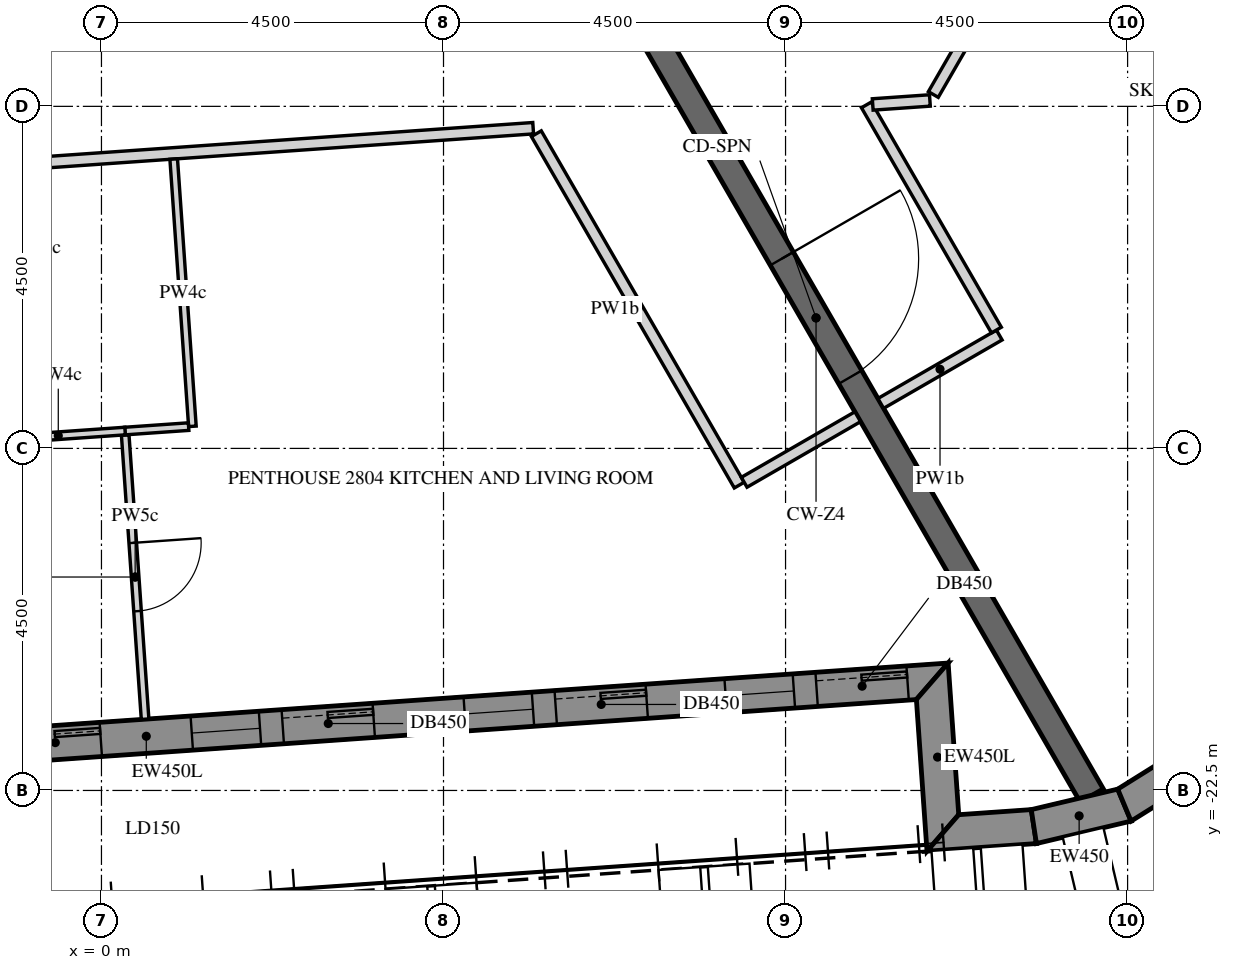
"""IFC4 building model, lengths in metres.
Left out: names, types, materials, properties, quantities, classifications, styles, units other than length and angle.
Written with IfcOpenShell. Run it as: python <this file> out.ifc"""

import sys

from ifc_helpers import new_model, si_unit, direction, frame, frame_2d, origin, place, context, subcontext, project, spatial, polyline, rectangle, outline, extrude, element, fill, save


model = new_model("IFC4")
c1 = context("Model", 3, precision=1e-05, world=origin(), true_north=direction((0.0, 1.0)))
c2 = subcontext(c1, "Body", "Model", "MODEL_VIEW")
j1 = project(units=[si_unit("LENGTHUNIT", "METRE"), si_unit("PLANEANGLEUNIT", "RADIAN")], contexts=[c1])
p1 = place(None, origin())
s1 = spatial("IfcSite", under=j1, at=p1, CompositionType="ELEMENT")
p2 = place(p1, origin())
s2 = spatial("IfcBuilding", under=s1, at=p2, CompositionType="ELEMENT")
p3 = place(p2, frame((0.0, 0.0, 361.2)))
s3 = spatial("IfcBuildingStorey", under=s2, at=p3, CompositionType="ELEMENT", Elevation=361.2)
p4 = place(p3, frame((-9.751, -22.51, -0.15), z_axis=(0.0, 0.0, 1.0), x_axis=(0.997564460173, 0.06975061147, 0.0)))
e1 = element("IfcWall", 1, at=p4, inside=s3, PredefinedType="SOLIDWALL", context=c2, shape_type="SweptSolid", body=[
    extrude(outline(polyline([(0.225, -0.225), (20.507, -0.225), (20.957, 0.225), (-0.225, 0.225), (0.225, -0.225)])), origin(), (0.0, 0.0, 1.0), 3.9),
])
p5 = place(p4, frame((0.325, 0.0, 1.05)))
e2 = element("IfcOpeningElement", 2, at=p5, cuts=e1, PredefinedType="OPENING", context=c2, shape_type="SweptSolid", body=[
    extrude(rectangle(XDim=0.9, YDim=1.5, at=frame_2d((0.45, 0.75))), frame((0.0, 0.235, 0.0), z_axis=(0.0, -1.0, 0.0), x_axis=(1.0, 0.0, 0.0)), (0.0, 0.0, 1.0), 0.47),
])
p6 = place(p4, frame((1.525, 0.0, 0.15)))
e3 = element("IfcOpeningElement", 3, at=p6, cuts=e1, PredefinedType="OPENING", context=c2, shape_type="SweptSolid", body=[
    extrude(rectangle(XDim=1.2, YDim=2.4, at=frame_2d((0.6, 1.2))), frame((0.0, 0.235, 0.0), z_axis=(0.0, -1.0, 0.0), x_axis=(1.0, 0.0, 0.0)), (0.0, 0.0, 1.0), 0.47),
])
p7 = place(p4, frame((3.766, 0.0, 1.05)))
e4 = element("IfcOpeningElement", 4, at=p7, cuts=e1, PredefinedType="OPENING", context=c2, shape_type="SweptSolid", body=[
    extrude(rectangle(XDim=0.9, YDim=1.5, at=frame_2d((0.45, 0.75))), frame((0.0, 0.235, 0.0), z_axis=(0.0, -1.0, 0.0), x_axis=(1.0, 0.0, 0.0)), (0.0, 0.0, 1.0), 0.47),
])
p8 = place(p4, frame((4.966, 0.0, 0.15)))
e5 = element("IfcOpeningElement", 5, at=p8, cuts=e1, PredefinedType="OPENING", context=c2, shape_type="SweptSolid", body=[
    extrude(rectangle(XDim=1.2, YDim=2.4, at=frame_2d((0.6, 1.2))), frame((0.0, 0.235, 0.0), z_axis=(0.0, -1.0, 0.0), x_axis=(1.0, 0.0, 0.0)), (0.0, 0.0, 1.0), 0.47),
])
p9 = place(p4, frame((7.366, 0.0, 1.05)))
e6 = element("IfcOpeningElement", 6, at=p9, cuts=e1, PredefinedType="OPENING", context=c2, shape_type="SweptSolid", body=[
    extrude(rectangle(XDim=0.9, YDim=1.5, at=frame_2d((0.45, 0.75))), frame((0.0, 0.235, 0.0), z_axis=(0.0, -1.0, 0.0), x_axis=(1.0, 0.0, 0.0)), (0.0, 0.0, 1.0), 0.47),
])
p10 = place(p4, frame((8.566, 0.0, 0.15)))
e7 = element("IfcOpeningElement", 7, at=p10, cuts=e1, PredefinedType="OPENING", context=c2, shape_type="SweptSolid", body=[
    extrude(rectangle(XDim=1.2, YDim=2.4, at=frame_2d((0.6, 1.2))), frame((0.0, 0.235, 0.0), z_axis=(0.0, -1.0, 0.0), x_axis=(1.0, 0.0, 0.0)), (0.0, 0.0, 1.0), 0.47),
])
p11 = place(p4, frame((10.966, 0.0, 1.05)))
e8 = element("IfcOpeningElement", 8, at=p11, cuts=e1, PredefinedType="OPENING", context=c2, shape_type="SweptSolid", body=[
    extrude(rectangle(XDim=0.9, YDim=1.5, at=frame_2d((0.45, 0.75))), frame((0.0, 0.235, 0.0), z_axis=(0.0, -1.0, 0.0), x_axis=(1.0, 0.0, 0.0)), (0.0, 0.0, 1.0), 0.47),
])
p12 = place(p4, frame((12.166, 0.0, 0.15)))
e9 = element("IfcOpeningElement", 9, at=p12, cuts=e1, PredefinedType="OPENING", context=c2, shape_type="SweptSolid", body=[
    extrude(rectangle(XDim=1.2, YDim=2.4, at=frame_2d((0.6, 1.2))), frame((0.0, 0.235, 0.0), z_axis=(0.0, -1.0, 0.0), x_axis=(1.0, 0.0, 0.0)), (0.0, 0.0, 1.0), 0.47),
])
p13 = place(p4, frame((14.566, 0.0, 1.05)))
e10 = element("IfcOpeningElement", 10, at=p13, cuts=e1, PredefinedType="OPENING", context=c2, shape_type="SweptSolid", body=[
    extrude(rectangle(XDim=0.9, YDim=1.5, at=frame_2d((0.45, 0.75))), frame((0.0, 0.235, 0.0), z_axis=(0.0, -1.0, 0.0), x_axis=(1.0, 0.0, 0.0)), (0.0, 0.0, 1.0), 0.47),
])
p14 = place(p4, frame((15.766, 0.0, 0.15)))
e11 = element("IfcOpeningElement", 11, at=p14, cuts=e1, PredefinedType="OPENING", context=c2, shape_type="SweptSolid", body=[
    extrude(rectangle(XDim=1.2, YDim=2.4, at=frame_2d((0.6, 1.2))), frame((0.0, 0.235, 0.0), z_axis=(0.0, -1.0, 0.0), x_axis=(1.0, 0.0, 0.0)), (0.0, 0.0, 1.0), 0.47),
])
p15 = place(p4, frame((18.007, 0.0, 1.05)))
e12 = element("IfcOpeningElement", 12, at=p15, cuts=e1, PredefinedType="OPENING", context=c2, shape_type="SweptSolid", body=[
    extrude(rectangle(XDim=0.9, YDim=1.5, at=frame_2d((0.45, 0.75))), frame((0.0, 0.235, 0.0), z_axis=(0.0, -1.0, 0.0), x_axis=(1.0, 0.0, 0.0)), (0.0, 0.0, 1.0), 0.47),
])
p16 = place(p4, frame((19.207, 0.0, 0.15)))
e13 = element("IfcOpeningElement", 13, at=p16, cuts=e1, PredefinedType="OPENING", context=c2, shape_type="SweptSolid", body=[
    extrude(rectangle(XDim=1.2, YDim=2.4, at=frame_2d((0.6, 1.2))), frame((0.0, 0.235, 0.0), z_axis=(0.0, -1.0, 0.0), x_axis=(1.0, 0.0, 0.0)), (0.0, 0.0, 1.0), 0.47),
])
p17 = place(p3, frame((10.93, -21.064, -0.15), z_axis=(0.0, 0.0, 1.0), x_axis=(0.069702791886, -0.99756780261, 0.0)))
e14 = element("IfcWall", 14, at=p17, inside=s3, PredefinedType="SOLIDWALL", context=c2, shape_type="SweptSolid", body=[
    extrude(outline(polyline([(0.225, -0.225), (2.225, -0.225), (1.775, 0.225), (-0.225, 0.225), (0.225, -0.225)])), origin(), (0.0, 0.0, 1.0), 3.9),
])
p18 = place(p3, frame((11.07, -23.059, -0.15), z_axis=(0.0, 0.0, 1.0), x_axis=(0.997562933087, 0.069772448216, 0.0)))
e15 = element("IfcWall", 15, at=p18, inside=s3, PredefinedType="SOLIDWALL", context=c2, shape_type="SweptSolid", body=[
    extrude(outline(polyline([(-0.225, -0.225), (1.219, -0.225), (1.182, 0.225), (0.225, 0.225), (-0.225, -0.225)])), origin(), (0.0, 0.0, 1.0), 3.9),
])
p19 = place(p3, frame((12.267, -22.975, -0.15), z_axis=(0.0, 0.0, 1.0), x_axis=(0.973026131006, 0.230694924913, 0.0)))
e16 = element("IfcWall", 16, at=p19, inside=s3, PredefinedType="SOLIDWALL", context=c2, shape_type="SweptSolid", body=[
    extrude(outline(polyline([(-0.018, -0.225), (1.261, -0.225), (1.188, 0.225), (0.018, 0.225), (-0.018, -0.225)])), origin(), (0.0, 0.0, 1.0), 3.9),
])
p20 = place(p3, frame((13.458, -22.693, -0.15), z_axis=(0.0, 0.0, 1.0), x_axis=(0.848009505552, 0.529981017107, 0.0)))
e17 = element("IfcWall", 17, at=p20, inside=s3, PredefinedType="SOLIDWALL", context=c2, shape_type="SweptSolid", body=[
    extrude(outline(polyline([(-0.037, -0.225), (1.261, -0.225), (1.188, 0.225), (0.037, 0.225), (-0.037, -0.225)])), origin(), (0.0, 0.0, 1.0), 3.9),
])
p21 = place(p3, frame((5.773, -10.0, -0.15), z_axis=(0.0, 0.0, 1.0), x_axis=(0.500007911273, -0.866020836161, 0.0)))
e18 = element("IfcWall", 18, at=p21, inside=s3, PredefinedType="SHEAR", context=c2, shape_type="SweptSolid", body=[
    extrude(rectangle(XDim=14.51, YDim=0.35, at=frame_2d((7.255, 0.0))), origin(), (0.0, 0.0, 1.0), 3.9),
])
p22 = place(p21, frame((6.355, 0.0, 0.15)))
e19 = element("IfcOpeningElement", 19, at=p22, cuts=e18, PredefinedType="OPENING", context=c2, shape_type="SweptSolid", body=[
    extrude(rectangle(XDim=1.8, YDim=2.4, at=frame_2d((0.9, 1.2))), frame((0.0, 0.185, 0.0), z_axis=(0.0, -1.0, 0.0), x_axis=(1.0, 0.0, 0.0)), (0.0, 0.0, 1.0), 0.37),
])
p23 = place(p3, frame((-9.97, -14.882, 0.0), z_axis=(0.0, 0.0, 1.0), x_axis=(0.997564384496, 0.06975169378, 0.0)))
e20 = element("IfcWall", 20, at=p23, inside=s3, PredefinedType="PARTITIONING", context=c2, shape_type="SweptSolid", body=[
    extrude(rectangle(XDim=15.688, YDim=0.15, at=frame_2d((7.844, 0.0))), origin(), (0.0, 0.0, 1.0), 2.82),
])
p24 = place(p23, frame((6.042, 0.0, 0.0)))
e21 = element("IfcOpeningElement", 21, at=p24, cuts=e20, PredefinedType="OPENING", context=c2, shape_type="SweptSolid", body=[
    extrude(rectangle(XDim=1.0, YDim=2.1, at=frame_2d((0.5, 1.05))), frame((0.0, 0.085, 0.0), z_axis=(0.0, -1.0, 0.0), x_axis=(1.0, 0.0, 0.0)), (0.0, 0.0, 1.0), 0.17),
])
p25 = place(p3, frame((5.721, -13.86, 0.0), z_axis=(0.0, 0.0, 1.0), x_axis=(0.499970524249, -0.866042420948, 0.0)))
e22 = element("IfcWall", 22, at=p25, inside=s3, PredefinedType="PARTITIONING", context=c2, shape_type="SweptSolid", body=[
    extrude(rectangle(XDim=5.339, YDim=0.15, at=frame_2d((2.669, 0.0))), origin(), (0.0, 0.0, 1.0), 2.82),
])
p26 = place(p3, frame((8.456, -18.446, 0.0), z_axis=(0.0, 0.0, 1.0), x_axis=(0.866013532718, 0.500020560727, 0.0)))
e23 = element("IfcWall", 23, at=p26, inside=s3, PredefinedType="PARTITIONING", context=c2, shape_type="SweptSolid", body=[
    extrude(rectangle(XDim=1.725, YDim=0.15, at=frame_2d((0.863, 0.0))), origin(), (0.0, 0.0, 1.0), 2.82),
])
p27 = place(p3, frame((6.245, -11.944, 0.0), z_axis=(0.0, 0.0, 1.0), x_axis=(-0.997564707029, -0.069747080866, 0.0)))
e24 = element("IfcWall", 24, at=p27, inside=s3, PredefinedType="PARTITIONING", context=c2, shape_type="SweptSolid", body=[
    extrude(rectangle(XDim=15.339, YDim=0.15, at=frame_2d((7.669, 0.0))), origin(), (0.0, 0.0, 1.0), 2.82),
])
p28 = place(p27, frame((7.219, 0.0, 0.0)))
e25 = element("IfcOpeningElement", 25, at=p28, cuts=e24, PredefinedType="OPENING", context=c2, shape_type="SweptSolid", body=[
    extrude(rectangle(XDim=0.9, YDim=2.1, at=frame_2d((0.45, 1.05))), frame((0.0, 0.085, 0.0), z_axis=(0.0, -1.0, 0.0), x_axis=(1.0, 0.0, 0.0)), (0.0, 0.0, 1.0), 0.17),
])
p29 = place(p3, frame((10.253, -17.408, 0.0), z_axis=(0.0, 0.0, 1.0), x_axis=(0.866047807691, 0.499961193289, 0.0)))
e26 = element("IfcWall", 26, at=p29, inside=s3, PredefinedType="PARTITIONING", context=c2, shape_type="SweptSolid", body=[
    extrude(rectangle(XDim=1.8, YDim=0.15, at=frame_2d((0.9, 0.0))), origin(), (0.0, 0.0, 1.0), 2.82),
])
p30 = place(p3, frame((11.774, -16.443, 0.0), z_axis=(0.0, 0.0, 1.0), x_axis=(-0.499938683108, 0.866060802215, 0.0)))
e27 = element("IfcWall", 27, at=p30, inside=s3, PredefinedType="PARTITIONING", context=c2, shape_type="SweptSolid", body=[
    extrude(rectangle(XDim=3.421, YDim=0.15, at=frame_2d((1.71, 0.0))), origin(), (0.0, 0.0, 1.0), 2.82),
])
p31 = place(p3, frame((10.147, -13.475, 0.0), z_axis=(0.0, 0.0, 1.0), x_axis=(0.997549934395, 0.069958047347, 0.0)))
e28 = element("IfcWall", 28, at=p31, inside=s3, PredefinedType="PARTITIONING", context=c2, shape_type="SweptSolid", body=[
    extrude(rectangle(XDim=0.754, YDim=0.15, at=frame_2d((0.377, 0.0))), origin(), (0.0, 0.0, 1.0), 2.82),
])
p32 = place(p3, frame((10.944, -13.344, 0.0), z_axis=(0.0, 0.0, 1.0), x_axis=(0.500003210163, 0.866023550388, 0.0)))
e29 = element("IfcWall", 29, at=p32, inside=s3, PredefinedType="PARTITIONING", context=c2, shape_type="SweptSolid", body=[
    extrude(rectangle(XDim=13.951, YDim=0.15, at=frame_2d((6.975, 0.0))), origin(), (0.0, 0.0, 1.0), 2.82),
])
p33 = place(p32, frame((1.116, 0.0, 0.0)))
e30 = element("IfcOpeningElement", 30, at=p33, cuts=e29, PredefinedType="OPENING", context=c2, shape_type="SweptSolid", body=[
    extrude(rectangle(XDim=1.0, YDim=2.1, at=frame_2d((0.5, 1.05))), frame((0.0, 0.085, 0.0), z_axis=(0.0, -1.0, 0.0), x_axis=(1.0, 0.0, 0.0)), (0.0, 0.0, 1.0), 0.17),
])
p34 = place(p32, frame((10.416, 0.0, 0.0)))
e31 = element("IfcOpeningElement", 31, at=p34, cuts=e29, PredefinedType="OPENING", context=c2, shape_type="SweptSolid", body=[
    extrude(rectangle(XDim=1.0, YDim=2.1, at=frame_2d((0.5, 1.05))), frame((0.0, 0.085, 0.0), z_axis=(0.0, -1.0, 0.0), x_axis=(1.0, 0.0, 0.0)), (0.0, 0.0, 1.0), 0.17),
])
p35 = place(p3, frame((0.312, -17.822, 0.0), z_axis=(0.0, 0.0, 1.0), x_axis=(0.069789608916, -0.99756173267, 0.0)))
e32 = element("IfcWall", 32, at=p35, inside=s3, PredefinedType="PARTITIONING", context=c2, shape_type="SweptSolid", body=[
    extrude(rectangle(XDim=3.75, YDim=0.1, at=frame_2d((1.875, 0.0))), origin(), (0.0, 0.0, 1.0), 2.82),
])
p36 = place(p35, frame((1.425, 0.0, 0.0)))
e33 = element("IfcOpeningElement", 33, at=p36, cuts=e32, PredefinedType="OPENING", context=c2, shape_type="SweptSolid", body=[
    extrude(rectangle(XDim=0.9, YDim=2.1, at=frame_2d((0.45, 1.05))), frame((0.0, 0.06, 0.0), z_axis=(0.0, -1.0, 0.0), x_axis=(1.0, 0.0, 0.0)), (0.0, 0.0, 1.0), 0.12),
])
p37 = place(p3, frame((0.95, -14.193, 0.0), z_axis=(0.0, 0.0, 1.0), x_axis=(0.069745730407, -0.997564801449, 0.0)))
e34 = element("IfcWall", 34, at=p37, inside=s3, PredefinedType="PARTITIONING", context=c2, shape_type="SweptSolid", body=[
    extrude(rectangle(XDim=3.525, YDim=0.1, at=frame_2d((1.762, 0.0))), origin(), (0.0, 0.0, 1.0), 2.82),
])
p38 = place(p3, frame((1.146, -17.713, 0.0), z_axis=(0.0, 0.0, 1.0), x_axis=(-0.997553508491, -0.069907064713, 0.0)))
e35 = element("IfcWall", 35, at=p38, inside=s3, PredefinedType="PARTITIONING", context=c2, shape_type="SweptSolid", body=[
    extrude(rectangle(XDim=0.842, YDim=0.1, at=frame_2d((0.421, 0.0))), origin(), (0.0, 0.0, 1.0), 2.82),
])
p39 = place(p3, frame((0.311, -17.771, 0.0), z_axis=(0.0, 0.0, 1.0), x_axis=(-0.997559642586, -0.069819477831, 0.0)))
e36 = element("IfcWall", 36, at=p39, inside=s3, PredefinedType="PARTITIONING", context=c2, shape_type="SweptSolid", body=[
    extrude(rectangle(XDim=1.762, YDim=0.1, at=frame_2d((0.881, 0.0))), origin(), (0.0, 0.0, 1.0), 2.82),
])
p40 = place(p10, frame((0.0, 0.15, 0.0)))
e37 = element("IfcDoor", 37, at=p40, inside=s3, OperationType="SLIDING_TO_LEFT", PredefinedType="DOOR", context=c2, shape_type="SweptSolid", body=[
    extrude(rectangle(XDim=1.2, YDim=2.4, at=frame_2d((0.6, 1.2))), frame((0.0, 0.025, 0.0), z_axis=(0.0, -1.0, 0.0), x_axis=(1.0, 0.0, 0.0)), (0.0, 0.0, 1.0), 0.05),
])
fill(e7, e37)
p41 = place(p11, frame((0.0, 0.155, 0.0)))
e38 = element("IfcWindow", 38, at=p41, inside=s3, PartitioningType="SINGLE_PANEL", PredefinedType="WINDOW", context=c2, shape_type="SweptSolid", body=[
    extrude(rectangle(XDim=0.9, YDim=1.5, at=frame_2d((0.45, 0.75))), frame((0.0, 0.03, 0.0), z_axis=(0.0, -1.0, 0.0), x_axis=(1.0, 0.0, 0.0)), (0.0, 0.0, 1.0), 0.06),
])
fill(e8, e38)
p42 = place(p12, frame((0.0, 0.15, 0.0)))
e39 = element("IfcDoor", 39, at=p42, inside=s3, OperationType="SLIDING_TO_LEFT", PredefinedType="DOOR", context=c2, shape_type="SweptSolid", body=[
    extrude(rectangle(XDim=1.2, YDim=2.4, at=frame_2d((0.6, 1.2))), frame((0.0, 0.025, 0.0), z_axis=(0.0, -1.0, 0.0), x_axis=(1.0, 0.0, 0.0)), (0.0, 0.0, 1.0), 0.05),
])
fill(e9, e39)
p43 = place(p13, frame((0.0, 0.155, 0.0)))
e40 = element("IfcWindow", 40, at=p43, inside=s3, PartitioningType="SINGLE_PANEL", PredefinedType="WINDOW", context=c2, shape_type="SweptSolid", body=[
    extrude(rectangle(XDim=0.9, YDim=1.5, at=frame_2d((0.45, 0.75))), frame((0.0, 0.03, 0.0), z_axis=(0.0, -1.0, 0.0), x_axis=(1.0, 0.0, 0.0)), (0.0, 0.0, 1.0), 0.06),
])
fill(e10, e40)
p44 = place(p14, frame((0.0, 0.15, 0.0)))
e41 = element("IfcDoor", 41, at=p44, inside=s3, OperationType="SLIDING_TO_LEFT", PredefinedType="DOOR", context=c2, shape_type="SweptSolid", body=[
    extrude(rectangle(XDim=1.2, YDim=2.4, at=frame_2d((0.6, 1.2))), frame((0.0, 0.025, 0.0), z_axis=(0.0, -1.0, 0.0), x_axis=(1.0, 0.0, 0.0)), (0.0, 0.0, 1.0), 0.05),
])
fill(e11, e41)
p45 = place(p15, frame((0.0, 0.155, 0.0)))
e42 = element("IfcWindow", 42, at=p45, inside=s3, PartitioningType="SINGLE_PANEL", PredefinedType="WINDOW", context=c2, shape_type="SweptSolid", body=[
    extrude(rectangle(XDim=0.9, YDim=1.5, at=frame_2d((0.45, 0.75))), frame((0.0, 0.03, 0.0), z_axis=(0.0, -1.0, 0.0), x_axis=(1.0, 0.0, 0.0)), (0.0, 0.0, 1.0), 0.06),
])
fill(e12, e42)
p46 = place(p16, frame((0.0, 0.15, 0.0)))
e43 = element("IfcDoor", 43, at=p46, inside=s3, OperationType="SLIDING_TO_LEFT", PredefinedType="DOOR", context=c2, shape_type="SweptSolid", body=[
    extrude(rectangle(XDim=1.2, YDim=2.4, at=frame_2d((0.6, 1.2))), frame((0.0, 0.025, 0.0), z_axis=(0.0, -1.0, 0.0), x_axis=(1.0, 0.0, 0.0)), (0.0, 0.0, 1.0), 0.05),
])
fill(e13, e43)
p47 = place(p22, origin())
e44 = element("IfcDoor", 44, at=p47, inside=s3, OperationType="DOUBLE_DOOR_SINGLE_SWING", PredefinedType="DOOR", context=c2, shape_type="SweptSolid", body=[
    extrude(rectangle(XDim=1.8, YDim=2.4, at=frame_2d((0.9, 1.2))), frame((0.0, 0.025, 0.0), z_axis=(0.0, -1.0, 0.0), x_axis=(1.0, 0.0, 0.0)), (0.0, 0.0, 1.0), 0.05),
])
fill(e19, e44)
p48 = place(p36, origin())
e45 = element("IfcDoor", 45, at=p48, inside=s3, OperationType="SINGLE_SWING_LEFT", PredefinedType="DOOR", context=c2, shape_type="SweptSolid", body=[
    extrude(rectangle(XDim=0.9, YDim=2.1, at=frame_2d((0.45, 1.05))), frame((0.0, 0.025, 0.0), z_axis=(0.0, -1.0, 0.0), x_axis=(1.0, 0.0, 0.0)), (0.0, 0.0, 1.0), 0.05),
])
fill(e33, e45)
save(model, sys.argv[1])
